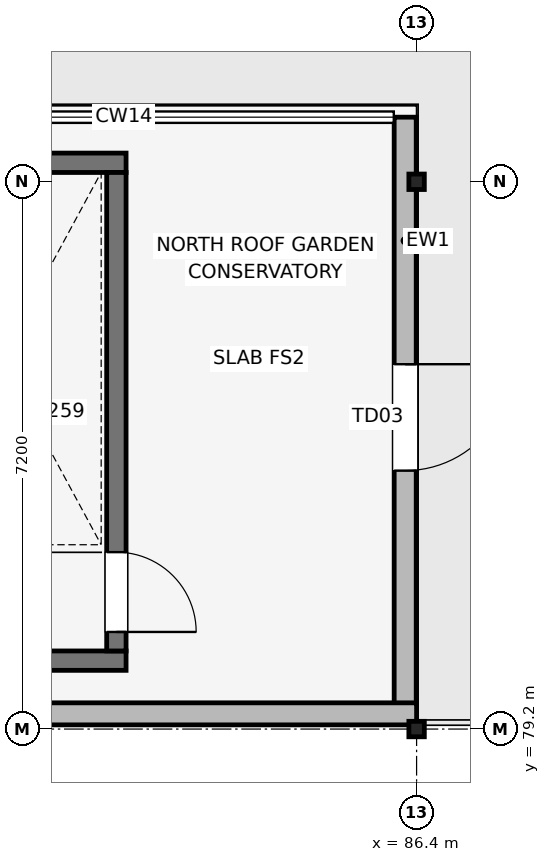
"""IFC4 building model, lengths in metres.
Left out: names, types, materials, properties, quantities, classifications, styles, units other than length and angle.
Written with IfcOpenShell. Run it as: python <this file> out.ifc"""

import sys

from ifc_helpers import new_model, si_unit, direction, frame, frame_2d, origin, origin_2d, place, context, subcontext, project, spatial, rectangle, i_section, extrude, element, fill, save


model = new_model("IFC4")
c1 = context("Model", 3, precision=1e-05, world=origin(), true_north=direction((0.0, 1.0)))
c2 = subcontext(c1, "Body", "Model", "MODEL_VIEW")
j1 = project(units=[si_unit("LENGTHUNIT", "METRE"), si_unit("PLANEANGLEUNIT", "RADIAN")], contexts=[c1])
p1 = place(None, origin())
s1 = spatial("IfcSite", under=j1, at=p1, CompositionType="ELEMENT")
p2 = place(p1, origin())
s2 = spatial("IfcBuilding", under=s1, at=p2, CompositionType="ELEMENT")
p3 = place(p2, frame((0.0, 0.0, 8.7)))
s3 = spatial("IfcBuildingStorey", under=s2, at=p3, CompositionType="ELEMENT", Elevation=8.7)
for number, where, z_axis, x_axis in (
    (1, (86.4, 79.2, 0.0), (0.0, 0.0, 1.0), (1.0, 0.0, 0.0)),
    (2, (86.4, 86.4, 0.0), (0.0, 0.0, 1.0), (1.0, 0.0, 0.0)),
):
    element("IfcColumn", number, at=place(p3, frame(where, z_axis=z_axis, x_axis=x_axis)), inside=s3, PredefinedType="COLUMN", context=c2, shape_type="SweptSolid", body=[
        extrude(i_section(OverallWidth=0.203, OverallDepth=0.203, WebThickness=0.007, FlangeThickness=0.011, FilletRadius=0.01, at=origin_2d()), origin(), (0.0, 0.0, 1.0), 3.15),
    ])
for number, where, z_axis, x_axis in (
    (3, (79.272, 80.1, 0.0), (0.0, 0.0, 1.0), (1.0, 0.0, 0.0)),
    (4, (79.272, 86.65, 0.0), (0.0, 0.0, 1.0), (1.0, 0.0, 0.0)),
):
    element("IfcWall", number, at=place(p3, frame(where, z_axis=z_axis, x_axis=x_axis)), inside=s3, PredefinedType="SHEAR", context=c2, shape_type="SweptSolid", body=[
        extrude(rectangle(XDim=3.305, YDim=0.255, at=frame_2d((1.652, 0.0))), origin(), (0.0, 0.0, 1.0), 3.15),
    ])
p4 = place(p3, frame((82.45, 80.228, 0.0), z_axis=(0.0, 0.0, 1.0), x_axis=(0.0, 1.0, 0.0)))
e5 = element("IfcWall", 5, at=p4, inside=s3, PredefinedType="SHEAR", context=c2, shape_type="SweptSolid", body=[
    extrude(rectangle(XDim=6.295, YDim=0.255, at=frame_2d((3.147, 0.0))), origin(), (0.0, 0.0, 1.0), 3.15),
])
p5 = place(p4, frame((1.3, 0.0, 0.0), z_axis=(0.0, 0.0, 1.0), x_axis=(-1.0, 0.0, 0.0)))
e6 = element("IfcOpeningElement", 6, at=p5, cuts=e5, PredefinedType="OPENING", context=c2, shape_type="SweptSolid", body=[
    extrude(rectangle(XDim=1.05, YDim=2.12, at=frame_2d((0.525, 1.06))), frame((0.0, 0.137, 0.0), z_axis=(0.0, -1.0, 0.0), x_axis=(1.0, 0.0, 0.0)), (0.0, 0.0, 1.0), 0.275),
])
p6 = place(p3, frame((86.25, 79.4, 0.0), z_axis=(0.0, 0.0, 1.0), x_axis=(0.0, 1.0, 0.0)))
e7 = element("IfcWall", 7, at=p6, inside=s3, PredefinedType="SOLIDWALL", context=c2, shape_type="SweptSolid", body=[
    extrude(rectangle(XDim=7.85, YDim=0.29, at=frame_2d((3.925, 0.0))), origin(), (0.0, 0.0, 1.0), 3.15),
])
p7 = place(p6, frame((4.6, 0.0, 0.0), z_axis=(0.0, 0.0, 1.0), x_axis=(-1.0, 0.0, 0.0)))
e8 = element("IfcOpeningElement", 8, at=p7, cuts=e7, PredefinedType="OPENING", context=c2, shape_type="SweptSolid", body=[
    extrude(rectangle(XDim=1.4, YDim=2.2, at=frame_2d((0.7, 1.1))), frame((0.0, 0.155, 0.0), z_axis=(0.0, -1.0, 0.0), x_axis=(1.0, 0.0, 0.0)), (0.0, 0.0, 1.0), 0.31),
])
p8 = place(p3, frame((78.8, 79.4, 0.0), z_axis=(0.0, 0.0, 1.0), x_axis=(1.0, 0.0, 0.0)))
e9 = element("IfcWall", 9, at=p8, inside=s3, PredefinedType="SOLIDWALL", context=c2, shape_type="SweptSolid", body=[
    extrude(rectangle(XDim=7.6, YDim=0.29, at=frame_2d((3.8, 0.0))), origin(), (0.0, 0.0, 1.0), 3.15),
])
p9 = place(p7, origin())
e10 = element("IfcDoor", 10, at=p9, inside=s3, OperationType="SINGLE_SWING_RIGHT", PredefinedType="DOOR", context=c2, shape_type="SweptSolid", body=[
    extrude(rectangle(XDim=1.4, YDim=2.2, at=frame_2d((0.7, 1.1))), frame((0.0, 0.025, 0.0), z_axis=(0.0, -1.0, 0.0), x_axis=(1.0, 0.0, 0.0)), (0.0, 0.0, 1.0), 0.05),
])
fill(e8, e10)
p10 = place(p5, origin())
e11 = element("IfcDoor", 11, at=p10, inside=s3, OperationType="SINGLE_SWING_LEFT", PredefinedType="DOOR", context=c2, shape_type="SweptSolid", body=[
    extrude(rectangle(XDim=1.05, YDim=2.12, at=frame_2d((0.525, 1.06))), frame((0.0, 0.025, 0.0), z_axis=(0.0, -1.0, 0.0), x_axis=(1.0, 0.0, 0.0)), (0.0, 0.0, 1.0), 0.05),
])
fill(e6, e11)
save(model, sys.argv[1])
